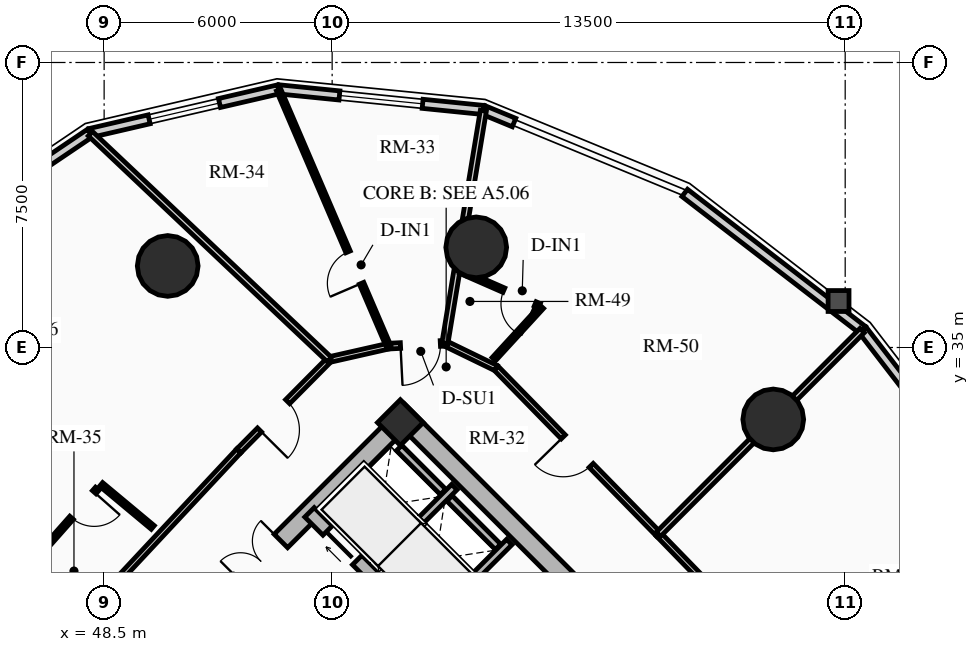
"""IFC4 building model, lengths in metres.
Left out: names, types, materials, properties, quantities, classifications, styles, units other than length and angle.
Written with IfcOpenShell. Run it as: python <this file> out.ifc"""

import sys

from ifc_helpers import new_model, si_unit, direction, frame, frame_2d, origin, origin_2d, place, context, subcontext, project, spatial, rectangle, circle, extrude, source, transform, mapped, element, fill, save


model = new_model("IFC4")
c1 = context("Model", 3, precision=1e-05, world=origin(), true_north=direction((0.0, 1.0)))
c2 = subcontext(c1, "Body", "Model", "MODEL_VIEW")
j1 = project(units=[si_unit("LENGTHUNIT", "METRE"), si_unit("PLANEANGLEUNIT", "RADIAN")], contexts=[c1])
p1 = place(None, origin())
s1 = spatial("IfcSite", under=j1, at=p1, CompositionType="ELEMENT")
p2 = place(p1, origin())
s2 = spatial("IfcBuilding", under=s1, at=p2, CompositionType="ELEMENT")
p3 = place(p2, frame((0.0, 0.0, 36.55)))
s3 = spatial("IfcBuildingStorey", under=s2, at=p3, CompositionType="ELEMENT", Elevation=36.55)
p4 = place(p3, frame((66.339, 23.227, 0.0), z_axis=(0.0, 0.0, 1.0), x_axis=(-0.707106781187, 0.707106781187, 0.0)))
e1 = element("IfcWall", 1, at=p4, inside=s3, PredefinedType="SHEAR", context=c2, shape_type="SweptSolid", body=[
    extrude(rectangle(XDim=14.3, YDim=0.5, at=frame_2d((7.15, 0.0))), origin(), (0.0, 0.0, 1.0), 2.91),
])
p5 = place(p3, frame((48.838, 25.596, 0.0), z_axis=(0.0, 0.0, 1.0), x_axis=(0.707106781187, 0.707106781187, 0.0)))
e2 = element("IfcWall", 2, at=p5, inside=s3, PredefinedType="SHEAR", context=c2, shape_type="SweptSolid", body=[
    extrude(rectangle(XDim=10.7, YDim=0.5, at=frame_2d((5.35, 0.0))), origin(), (0.0, 0.0, 1.0), 2.91),
])
m1 = source(origin(), c2, "Body", "SweptSolid", [
    extrude(rectangle(XDim=1.5, YDim=2.02, at=frame_2d((0.75, 1.01))), frame((0.0, 0.26, 0.0), z_axis=(0.0, -1.0, 0.0), x_axis=(1.0, 0.0, 0.0)), (0.0, 0.0, 1.0), 0.52),
])
p6 = place(p5, frame((4.6, 0.0, 0.0)))
e3 = element("IfcOpeningElement", 3, at=p6, cuts=e2, PredefinedType="OPENING", context=c2, shape_type="MappedRepresentation", body=[
    mapped(m1, transform((0.0, 0.0, 0.0), x_axis=(1.0, 0.0, 0.0), y_axis=(0.0, 1.0, 0.0), z_axis=(0.0, 0.0, 1.0), scale=1.0)),
])
p7 = place(p3, frame((63.662, 20.904, 0.0), z_axis=(0.0, 0.0, 1.0), x_axis=(-0.707106781187, 0.707106781187, 0.0)))
e4 = element("IfcWall", 4, at=p7, inside=s3, PredefinedType="SHEAR", context=c2, shape_type="SweptSolid", body=[
    extrude(rectangle(XDim=13.8, YDim=0.35, at=frame_2d((6.9, 0.0))), origin(), (0.0, 0.0, 1.0), 2.91),
])
m2 = source(origin(), c2, "Body", "SweptSolid", [
    extrude(rectangle(XDim=1.1, YDim=2.015, at=frame_2d((0.55, 1.007))), frame((0.0, 0.185, 0.0), z_axis=(0.0, -1.0, 0.0), x_axis=(1.0, 0.0, 0.0)), (0.0, 0.0, 1.0), 0.37),
])
p8 = place(p7, frame((10.025, 0.0, 0.0)))
e5 = element("IfcOpeningElement", 5, at=p8, cuts=e4, PredefinedType="OPENING", context=c2, shape_type="MappedRepresentation", body=[
    mapped(m2, transform((0.0, 0.0, 0.0), x_axis=(1.0, 0.0, 0.0), y_axis=(0.0, 1.0, 0.0), z_axis=(0.0, 0.0, 1.0), scale=1.0)),
])
p9 = place(p7, frame((12.025, 0.0, 0.0)))
e6 = element("IfcOpeningElement", 6, at=p9, cuts=e4, PredefinedType="OPENING", context=c2, shape_type="MappedRepresentation", body=[
    mapped(m2, transform((0.0, 0.0, 0.0), x_axis=(1.0, 0.0, 0.0), y_axis=(0.0, 1.0, 0.0), z_axis=(0.0, 0.0, 1.0), scale=1.0)),
])
m3 = source(origin(), c2, "Body", "SweptSolid", [
    extrude(rectangle(XDim=1.15, YDim=2.02, at=frame_2d((0.575, 1.01))), frame((0.0, 0.185, 0.0), z_axis=(0.0, -1.0, 0.0), x_axis=(1.0, 0.0, 0.0)), (0.0, 0.0, 1.0), 0.37),
])
p10 = place(p7, frame((5.33, 0.0, 0.0)))
e7 = element("IfcOpeningElement", 7, at=p10, cuts=e4, PredefinedType="OPENING", context=c2, shape_type="MappedRepresentation", body=[
    mapped(m3, transform((0.0, 0.0, 0.0), x_axis=(1.0, 0.0, 0.0), y_axis=(0.0, 1.0, 0.0), z_axis=(0.0, 0.0, 1.0), scale=1.0)),
])
p11 = place(p3, frame((56.294, 33.024, 0.0), z_axis=(0.0, 0.0, 1.0), x_axis=(0.707106781187, 0.707106781187, 0.0)))
e8 = element("IfcColumn", 8, at=p11, inside=s3, PredefinedType="COLUMN", context=c2, shape_type="SweptSolid", body=[
    extrude(rectangle(XDim=0.85, YDim=0.85, at=origin_2d()), origin(), (0.0, 0.0, 1.0), 2.91),
])
for number, where, z_axis, x_axis in (
    (9, (66.107, 33.107, 0.0), (0.0, 0.0, 1.0), (1.0, 0.0, 0.0)),
    (10, (58.291, 37.635, 0.0), (0.0, 0.0, 1.0), (1.0, 0.0, 0.0)),
    (11, (50.173, 37.146, 0.0), (0.0, 0.0, 1.0), (1.0, 0.0, 0.0)),
):
    element("IfcColumn", number, at=place(p3, frame(where, z_axis=z_axis, x_axis=x_axis)), inside=s3, PredefinedType="USERDEFINED", context=c2, shape_type="SweptSolid", body=[
        extrude(circle(Radius=0.8, at=origin_2d()), origin(), (0.0, 0.0, 1.0), 2.91),
    ])
p12 = place(p3, frame((63.778, 39.068, 0.0), z_axis=(0.0, 0.0, 1.0), x_axis=(0.792020182601, -0.610494906082, 0.0)))
e12 = element("IfcWall", 12, at=p12, inside=s3, PredefinedType="SOLIDWALL", context=c2, shape_type="SweptSolid", body=[
    extrude(rectangle(XDim=5.911, YDim=0.24, at=frame_2d((2.956, 0.0))), origin(), (0.0, 0.0, 1.0), 2.073),
])
p13 = place(p3, frame((58.482, 41.251, 0.0), z_axis=(0.0, 0.0, 1.0), x_axis=(0.924556017656, -0.381046152345, 0.0)))
e13 = element("IfcWall", 13, at=p13, inside=s3, PredefinedType="SOLIDWALL", context=c2, shape_type="SweptSolid", body=[
    extrude(rectangle(XDim=0.87, YDim=0.24, at=frame_2d((0.435, 0.0))), origin(), (0.0, 0.0, 1.0), 2.073),
])
p14 = place(p3, frame((53.09, 41.794, 0.0), z_axis=(0.0, 0.0, 1.0), x_axis=(0.994968263437, -0.100190592135, 0.0)))
e14 = element("IfcWall", 14, at=p14, inside=s3, PredefinedType="SOLIDWALL", context=c2, shape_type="SweptSolid", body=[
    extrude(rectangle(XDim=5.419, YDim=0.24, at=frame_2d((2.71, 0.0))), origin(), (0.0, 0.0, 1.0), 2.073),
])
m4 = source(origin(), c2, "Body", "SweptSolid", [
    extrude(rectangle(XDim=2.2, YDim=1.35, at=frame_2d((1.1, 0.675))), frame((0.0, 0.13, 0.0), z_axis=(0.0, -1.0, 0.0), x_axis=(1.0, 0.0, 0.0)), (0.0, 0.0, 1.0), 0.26),
])
p15 = place(p14, frame((1.61, 0.0, 0.65)))
e15 = element("IfcOpeningElement", 15, at=p15, cuts=e14, PredefinedType="OPENING", context=c2, shape_type="MappedRepresentation", body=[
    mapped(m4, transform((0.0, 0.0, 0.0), x_axis=(1.0, 0.0, 0.0), y_axis=(0.0, 1.0, 0.0), z_axis=(0.0, 0.0, 1.0), scale=1.0)),
])
p16 = place(p3, frame((48.129, 40.644, 0.0), z_axis=(0.0, 0.0, 1.0), x_axis=(0.974167686491, 0.22582585901, 0.0)))
e16 = element("IfcWall", 16, at=p16, inside=s3, PredefinedType="SOLIDWALL", context=c2, shape_type="SweptSolid", body=[
    extrude(rectangle(XDim=5.092, YDim=0.24, at=frame_2d((2.546, 0.0))), origin(), (0.0, 0.0, 1.0), 2.073),
])
m5 = source(origin(), c2, "Body", "SweptSolid", [
    extrude(rectangle(XDim=1.9, YDim=1.35, at=frame_2d((0.95, 0.675))), frame((0.0, 0.13, 0.0), z_axis=(0.0, -1.0, 0.0), x_axis=(1.0, 0.0, 0.0)), (0.0, 0.0, 1.0), 0.26),
])
p17 = place(p16, frame((1.596, 0.0, 0.65)))
e17 = element("IfcOpeningElement", 17, at=p17, cuts=e16, PredefinedType="OPENING", context=c2, shape_type="MappedRepresentation", body=[
    mapped(m5, transform((0.0, 0.0, 0.0), x_axis=(1.0, 0.0, 0.0), y_axis=(0.0, 1.0, 0.0), z_axis=(0.0, 0.0, 1.0), scale=1.0)),
])
p18 = place(p3, frame((44.086, 37.914, 0.0), z_axis=(0.0, 0.0, 1.0), x_axis=(0.828748297084, 0.559621532896, 0.0)))
e18 = element("IfcWall", 18, at=p18, inside=s3, PredefinedType="SOLIDWALL", context=c2, shape_type="SweptSolid", body=[
    extrude(rectangle(XDim=4.879, YDim=0.24, at=frame_2d((2.439, 0.0))), origin(), (0.0, 0.0, 1.0), 2.073),
])
p19 = place(p3, frame((68.459, 35.459, 0.0), z_axis=(0.0, 0.0, 1.0), x_axis=(0.610494906082, -0.792020182601, 0.0)))
e19 = element("IfcWall", 19, at=p19, inside=s3, PredefinedType="SOLIDWALL", context=c2, shape_type="SweptSolid", body=[
    extrude(rectangle(XDim=5.911, YDim=0.24, at=frame_2d((2.956, 0.0))), origin(), (0.0, 0.0, 1.0), 2.073),
])
p20 = place(p19, frame((2.005, 0.0, 0.65)))
e20 = element("IfcOpeningElement", 20, at=p20, cuts=e19, PredefinedType="OPENING", context=c2, shape_type="MappedRepresentation", body=[
    mapped(m5, transform((0.0, 0.0, 0.0), x_axis=(1.0, 0.0, 0.0), y_axis=(0.0, 1.0, 0.0), z_axis=(0.0, 0.0, 1.0), scale=1.0)),
])
p21 = place(p3, frame((57.062, 27.781, 0.0), z_axis=(0.0, 0.0, 1.0), x_axis=(0.707106781187, 0.707106781187, 0.0)))
e21 = element("IfcWall", 21, at=p21, inside=s3, PredefinedType="SHEAR", context=c2, shape_type="SweptSolid", body=[
    extrude(rectangle(XDim=2.97, YDim=0.2, at=frame_2d((1.485, 0.0))), origin(), (0.0, 0.0, 1.0), 2.91),
])
p22 = place(p3, frame((55.615, 29.227, 0.0), z_axis=(0.0, 0.0, 1.0), x_axis=(0.707147878904, 0.70706568108, 0.0)))
e22 = element("IfcWall", 22, at=p22, inside=s3, PredefinedType="SHEAR", context=c2, shape_type="SweptSolid", body=[
    extrude(rectangle(XDim=2.97, YDim=0.2, at=frame_2d((1.485, 0.0))), origin(), (0.0, 0.0, 1.0), 2.91),
])
p23 = place(p3, frame((58.865, 29.754, 0.0), z_axis=(0.0, 0.0, 1.0), x_axis=(-0.707174411312, 0.707039144592, 0.0)))
e23 = element("IfcWall", 23, at=p23, inside=s3, PredefinedType="SHEAR", context=c2, shape_type="SweptSolid", body=[
    extrude(rectangle(XDim=1.805, YDim=0.2, at=frame_2d((0.902, 0.0))), origin(), (0.0, 0.0, 1.0), 2.91),
])
p24 = place(p3, frame((57.419, 31.2, 0.0), z_axis=(0.0, 0.0, 1.0), x_axis=(-0.707032117043, 0.707181437447, 0.0)))
e24 = element("IfcWall", 24, at=p24, inside=s3, PredefinedType="SHEAR", context=c2, shape_type="SweptSolid", body=[
    extrude(rectangle(XDim=1.635, YDim=0.2, at=frame_2d((0.817, 0.0))), origin(), (0.0, 0.0, 1.0), 2.91),
])
p25 = place(p3, frame((63.086, 30.086, 0.0), z_axis=(0.0, 0.0, 1.0), x_axis=(-0.699075897379, 0.715047473741, 0.0)))
e25 = element("IfcWall", 25, at=p25, inside=s3, PredefinedType="PARTITIONING", context=c2, shape_type="SweptSolid", body=[
    extrude(rectangle(XDim=6.114, YDim=0.15, at=frame_2d((3.057, 0.0))), origin(), (0.0, 0.0, 1.0), 2.159),
])
m6 = source(origin(), c2, "Body", "SweptSolid", [
    extrude(rectangle(XDim=1.05, YDim=2.015, at=frame_2d((0.525, 1.007))), frame((0.0, 0.085, 0.0), z_axis=(0.0, -1.0, 0.0), x_axis=(1.0, 0.0, 0.0)), (0.0, 0.0, 1.0), 0.17),
])
p26 = place(p25, frame((2.532, 0.0, 0.0)))
e26 = element("IfcOpeningElement", 26, at=p26, cuts=e25, PredefinedType="OPENING", context=c2, shape_type="MappedRepresentation", body=[
    mapped(m6, transform((0.0, 0.0, 0.0), x_axis=(1.0, 0.0, 0.0), y_axis=(0.0, 1.0, 0.0), z_axis=(0.0, 0.0, 1.0), scale=1.0)),
])
p27 = place(p3, frame((58.812, 34.458, 0.0), z_axis=(0.0, 0.0, 1.0), x_axis=(-0.899559490277, 0.436798264021, 0.0)))
e27 = element("IfcWall", 27, at=p27, inside=s3, PredefinedType="PARTITIONING", context=c2, shape_type="SweptSolid", body=[
    extrude(rectangle(XDim=1.495, YDim=0.15, at=frame_2d((0.748, 0.0))), origin(), (0.0, 0.0, 1.0), 2.205),
])
p28 = place(p3, frame((57.467, 35.111, 0.0), z_axis=(0.0, 0.0, 1.0), x_axis=(-0.998691757323, -0.051134859488, 0.0)))
e28 = element("IfcWall", 28, at=p28, inside=s3, PredefinedType="PARTITIONING", context=c2, shape_type="SweptSolid", body=[
    extrude(rectangle(XDim=1.485, YDim=0.15, at=frame_2d((0.742, 0.0))), origin(), (0.0, 0.0, 1.0), 2.159),
])
p29 = place(p28, frame((0.12, 0.0, 0.0)))
e29 = element("IfcOpeningElement", 29, at=p29, cuts=e28, PredefinedType="OPENING", context=c2, shape_type="MappedRepresentation", body=[
    mapped(m6, transform((0.0, 0.0, 0.0), x_axis=(1.0, 0.0, 0.0), y_axis=(0.0, 1.0, 0.0), z_axis=(0.0, 0.0, 1.0), scale=1.0)),
])
p30 = place(p3, frame((55.984, 35.035, 0.0), z_axis=(0.0, 0.0, 1.0), x_axis=(-0.975290305708, -0.22092718165, 0.0)))
e30 = element("IfcWall", 30, at=p30, inside=s3, PredefinedType="PARTITIONING", context=c2, shape_type="SweptSolid", body=[
    extrude(rectangle(XDim=1.597, YDim=0.15, at=frame_2d((0.798, 0.0))), origin(), (0.0, 0.0, 1.0), 2.205),
])
p31 = place(p3, frame((54.427, 34.683, 0.0), z_axis=(0.0, 0.0, 1.0), x_axis=(-0.704178989986, -0.710022499687, 0.0)))
e31 = element("IfcWall", 31, at=p31, inside=s3, PredefinedType="PARTITIONING", context=c2, shape_type="SweptSolid", body=[
    extrude(rectangle(XDim=3.384, YDim=0.15, at=frame_2d((1.692, 0.0))), origin(), (0.0, 0.0, 1.0), 2.159),
])
p32 = place(p31, frame((1.56, 0.0, 0.0)))
e32 = element("IfcOpeningElement", 32, at=p32, cuts=e31, PredefinedType="OPENING", context=c2, shape_type="MappedRepresentation", body=[
    mapped(m6, transform((0.0, 0.0, 0.0), x_axis=(1.0, 0.0, 0.0), y_axis=(0.0, 1.0, 0.0), z_axis=(0.0, 0.0, 1.0), scale=1.0)),
])
p33 = place(p3, frame((52.043, 32.28, 0.0), z_axis=(0.0, 0.0, 1.0), x_axis=(-0.682606081633, -0.730786519661, 0.0)))
e33 = element("IfcWall", 33, at=p33, inside=s3, PredefinedType="PARTITIONING", context=c2, shape_type="SweptSolid", body=[
    extrude(rectangle(XDim=6.527, YDim=0.15, at=frame_2d((3.263, 0.0))), origin(), (0.0, 0.0, 1.0), 2.159),
])
p34 = place(p3, frame((67.27, 25.78, 0.0), z_axis=(0.0, 0.0, 1.0), x_axis=(-0.696847842907, 0.717218992942, 0.0)))
e34 = element("IfcWall", 34, at=p34, inside=s3, PredefinedType="PARTITIONING", context=c2, shape_type="SweptSolid", body=[
    extrude(rectangle(XDim=6.004, YDim=0.15, at=frame_2d((3.002, 0.0))), origin(), (0.0, 0.0, 1.0), 2.635),
])
m7 = source(origin(), c2, "Body", "SweptSolid", [
    extrude(rectangle(XDim=1.0, YDim=2.015, at=frame_2d((0.5, 1.007))), frame((0.0, 0.085, 0.0), z_axis=(0.0, -1.0, 0.0), x_axis=(1.0, 0.0, 0.0)), (0.0, 0.0, 1.0), 0.17),
])
p35 = place(p34, frame((2.502, 0.0, 0.0)))
e35 = element("IfcOpeningElement", 35, at=p35, cuts=e34, PredefinedType="OPENING", context=c2, shape_type="MappedRepresentation", body=[
    mapped(m7, transform((0.0, 0.0, 0.0), x_axis=(1.0, 0.0, 0.0), y_axis=(0.0, 1.0, 0.0), z_axis=(0.0, 0.0, 1.0), scale=1.0)),
])
p36 = place(p3, frame((63.086, 30.086, 0.0), z_axis=(0.0, 0.0, 1.0), x_axis=(0.707106781187, 0.707106781187, 0.0)))
e36 = element("IfcWall", 36, at=p36, inside=s3, PredefinedType="PARTITIONING", context=c2, shape_type="SweptSolid", body=[
    extrude(rectangle(XDim=7.579, YDim=0.16, at=frame_2d((3.79, 0.0))), origin(), (0.0, 0.0, 1.0), 2.073),
])
p37 = place(p3, frame((57.467, 35.111, 0.0), z_axis=(0.0, 0.0, 1.0), x_axis=(0.163141505202, 0.986602680556, 0.0)))
e37 = element("IfcWall", 37, at=p37, inside=s3, PredefinedType="PARTITIONING", context=c2, shape_type="SweptSolid", body=[
    extrude(rectangle(XDim=6.203, YDim=0.16, at=frame_2d((3.102, 0.0))), origin(), (0.0, 0.0, 1.0), 2.073),
])
p38 = place(p3, frame((54.427, 34.683, 0.0), z_axis=(0.0, 0.0, 1.0), x_axis=(-0.726732956694, 0.686920089716, 0.0)))
e38 = element("IfcWall", 38, at=p38, inside=s3, PredefinedType="PARTITIONING", context=c2, shape_type="SweptSolid", body=[
    extrude(rectangle(XDim=8.653, YDim=0.16, at=frame_2d((4.326, 0.0))), origin(), (0.0, 0.0, 1.0), 2.073),
])
p39 = place(p3, frame((47.588, 27.51, 0.0), z_axis=(0.0, 0.0, 1.0), x_axis=(-0.699371977892, 0.714757886657, 0.0)))
e39 = element("IfcWall", 39, at=p39, inside=s3, PredefinedType="PARTITIONING", context=c2, shape_type="SweptSolid", body=[
    extrude(rectangle(XDim=8.886, YDim=0.16, at=frame_2d((4.443, 0.0))), origin(), (0.0, 0.0, 1.0), 2.073),
])
p40 = place(p3, frame((55.984, 35.035, 0.0), z_axis=(0.0, 0.0, 1.0), x_axis=(-0.394244760106, 0.919005478291, 0.0)))
e40 = element("IfcWall", 40, at=p40, inside=s3, PredefinedType="PARTITIONING", context=c2, shape_type="SweptSolid", body=[
    extrude(rectangle(XDim=7.333, YDim=0.125, at=frame_2d((3.667, 0.0))), origin(), (0.0, 0.0, 1.0), 2.073),
])
m8 = source(origin(), c2, "Body", "SweptSolid", [
    extrude(rectangle(XDim=0.9, YDim=2.005, at=frame_2d((0.45, 1.002))), frame((0.0, 0.073, 0.0), z_axis=(0.0, -1.0, 0.0), x_axis=(1.0, 0.0, 0.0)), (0.0, 0.0, 1.0), 0.145),
])
p41 = place(p40, frame((1.8, 0.0, 0.0)))
e41 = element("IfcOpeningElement", 41, at=p41, cuts=e40, PredefinedType="OPENING", context=c2, shape_type="MappedRepresentation", body=[
    mapped(m8, transform((0.0, 0.0, 0.0), x_axis=(1.0, 0.0, 0.0), y_axis=(0.0, 1.0, 0.0), z_axis=(0.0, 0.0, 1.0), scale=1.0)),
])
p42 = place(p3, frame((49.78, 30.264, 0.0), z_axis=(0.0, 0.0, 1.0), x_axis=(-0.768209972595, 0.640197967824, 0.0)))
e42 = element("IfcWall", 42, at=p42, inside=s3, PredefinedType="PARTITIONING", context=c2, shape_type="SweptSolid", body=[
    extrude(rectangle(XDim=1.77, YDim=0.125, at=frame_2d((0.885, 0.0))), origin(), (0.0, 0.0, 1.0), 2.635),
])
p43 = place(p3, frame((48.318, 31.282, 0.0), z_axis=(0.0, 0.0, 1.0), x_axis=(-0.662365127428, -0.749181178333, 0.0)))
e43 = element("IfcWall", 43, at=p43, inside=s3, PredefinedType="PARTITIONING", context=c2, shape_type="SweptSolid", body=[
    extrude(rectangle(XDim=2.953, YDim=0.125, at=frame_2d((1.477, 0.0))), origin(), (0.0, 0.0, 1.0), 2.159),
])
p44 = place(p43, frame((0.12, 0.0, 0.0)))
e44 = element("IfcOpeningElement", 44, at=p44, cuts=e43, PredefinedType="OPENING", context=c2, shape_type="MappedRepresentation", body=[
    mapped(m8, transform((0.0, 0.0, 0.0), x_axis=(1.0, 0.0, 0.0), y_axis=(0.0, 1.0, 0.0), z_axis=(0.0, 0.0, 1.0), scale=1.0)),
])
p45 = place(p3, frame((58.756, 34.694, 0.0), z_axis=(0.0, 0.0, 1.0), x_axis=(0.675641726749, 0.73723012491, 0.0)))
e45 = element("IfcWall", 45, at=p45, inside=s3, PredefinedType="PARTITIONING", context=c2, shape_type="SweptSolid", body=[
    extrude(rectangle(XDim=1.867, YDim=0.125, at=frame_2d((0.934, 0.0))), origin(), (0.0, 0.0, 1.0), 2.205),
])
p46 = place(p3, frame((59.952, 36.099, 0.0), z_axis=(0.0, 0.0, 1.0), x_axis=(-0.915914750605, 0.401372856113, 0.0)))
e46 = element("IfcWall", 46, at=p46, inside=s3, PredefinedType="PARTITIONING", context=c2, shape_type="SweptSolid", body=[
    extrude(rectangle(XDim=2.265, YDim=0.125, at=frame_2d((1.133, 0.0))), origin(), (0.0, 0.0, 1.0), 2.159),
])
p47 = place(p46, frame((0.12, 0.0, 0.0)))
e47 = element("IfcOpeningElement", 47, at=p47, cuts=e46, PredefinedType="OPENING", context=c2, shape_type="MappedRepresentation", body=[
    mapped(m8, transform((0.0, 0.0, 0.0), x_axis=(1.0, 0.0, 0.0), y_axis=(0.0, 1.0, 0.0), z_axis=(0.0, 0.0, 1.0), scale=1.0)),
])
m9 = source(origin(), c2, "Body", "SweptSolid", [
    extrude(rectangle(XDim=2.2, YDim=1.35, at=frame_2d((1.1, 0.675))), frame((0.0, 0.03, 0.0), z_axis=(0.0, -1.0, 0.0), x_axis=(1.0, 0.0, 0.0)), (0.0, 0.0, 1.0), 0.06),
])
p48 = place(p15, origin())
e48 = element("IfcWindow", 48, at=p48, inside=s3, PartitioningType="DOUBLE_PANEL_VERTICAL", PredefinedType="WINDOW", context=c2, shape_type="MappedRepresentation", body=[
    mapped(m9, transform((0.0, 0.0, 0.0), x_axis=(1.0, 0.0, 0.0), y_axis=(0.0, 1.0, 0.0), z_axis=(0.0, 0.0, 1.0), scale=1.0)),
])
fill(e15, e48)
m10 = source(origin(), c2, "Body", "SweptSolid", [
    extrude(rectangle(XDim=1.9, YDim=1.35, at=frame_2d((0.95, 0.675))), frame((0.0, 0.03, 0.0), z_axis=(0.0, -1.0, 0.0), x_axis=(1.0, 0.0, 0.0)), (0.0, 0.0, 1.0), 0.06),
])
p49 = place(p17, origin())
e49 = element("IfcWindow", 49, at=p49, inside=s3, PartitioningType="DOUBLE_PANEL_VERTICAL", PredefinedType="WINDOW", context=c2, shape_type="MappedRepresentation", body=[
    mapped(m10, transform((0.0, 0.0, 0.0), x_axis=(1.0, 0.0, 0.0), y_axis=(0.0, 1.0, 0.0), z_axis=(0.0, 0.0, 1.0), scale=1.0)),
])
fill(e17, e49)
m11 = source(origin(), c2, "Body", "SweptSolid", [
    extrude(rectangle(XDim=1.1, YDim=2.015, at=frame_2d((0.55, 1.007))), frame((0.0, 0.025, 0.0), z_axis=(0.0, -1.0, 0.0), x_axis=(1.0, 0.0, 0.0)), (0.0, 0.0, 1.0), 0.05),
])
p50 = place(p9, origin())
e50 = element("IfcDoor", 50, at=p50, inside=s3, OperationType="SLIDING_TO_RIGHT", PredefinedType="DOOR", context=c2, shape_type="MappedRepresentation", body=[
    mapped(m11, transform((0.0, 0.0, 0.0), x_axis=(1.0, 0.0, 0.0), y_axis=(0.0, 1.0, 0.0), z_axis=(0.0, 0.0, 1.0), scale=1.0)),
])
fill(e6, e50)
m12 = source(origin(), c2, "Body", "SweptSolid", [
    extrude(rectangle(XDim=1.5, YDim=2.02, at=frame_2d((0.75, 1.01))), frame((0.0, 0.025, 0.0), z_axis=(0.0, -1.0, 0.0), x_axis=(1.0, 0.0, 0.0)), (0.0, 0.0, 1.0), 0.05),
])
p51 = place(p6, origin())
e51 = element("IfcDoor", 51, at=p51, inside=s3, OperationType="DOUBLE_DOOR_SINGLE_SWING", PredefinedType="DOOR", context=c2, shape_type="MappedRepresentation", body=[
    mapped(m12, transform((0.0, 0.0, 0.0), x_axis=(1.0, 0.0, 0.0), y_axis=(0.0, 1.0, 0.0), z_axis=(0.0, 0.0, 1.0), scale=1.0)),
])
fill(e3, e51)
m13 = source(origin(), c2, "Body", "SweptSolid", [
    extrude(rectangle(XDim=1.05, YDim=2.015, at=frame_2d((0.525, 1.007))), frame((0.0, 0.025, 0.0), z_axis=(0.0, -1.0, 0.0), x_axis=(1.0, 0.0, 0.0)), (0.0, 0.0, 1.0), 0.05),
])
p52 = place(p29, origin())
e52 = element("IfcDoor", 52, at=p52, inside=s3, OperationType="SINGLE_SWING_RIGHT", PredefinedType="DOOR", context=c2, shape_type="MappedRepresentation", body=[
    mapped(m13, transform((0.0, 0.0, 0.0), x_axis=(1.0, 0.0, 0.0), y_axis=(0.0, 1.0, 0.0), z_axis=(0.0, 0.0, 1.0), scale=1.0)),
])
fill(e29, e52)
m14 = source(origin(), c2, "Body", "SweptSolid", [
    extrude(rectangle(XDim=0.9, YDim=2.005, at=frame_2d((0.45, 1.002))), frame((0.0, 0.025, 0.0), z_axis=(0.0, -1.0, 0.0), x_axis=(1.0, 0.0, 0.0)), (0.0, 0.0, 1.0), 0.05),
])
p53 = place(p41, origin())
e53 = element("IfcDoor", 53, at=p53, inside=s3, OperationType="SINGLE_SWING_LEFT", PredefinedType="DOOR", context=c2, shape_type="MappedRepresentation", body=[
    mapped(m14, transform((0.0, 0.0, 0.0), x_axis=(1.0, 0.0, 0.0), y_axis=(0.0, 1.0, 0.0), z_axis=(0.0, 0.0, 1.0), scale=1.0)),
])
fill(e41, e53)
p54 = place(p32, origin())
e54 = element("IfcDoor", 54, at=p54, inside=s3, OperationType="SINGLE_SWING_RIGHT", PredefinedType="DOOR", context=c2, shape_type="MappedRepresentation", body=[
    mapped(m13, transform((0.0, 0.0, 0.0), x_axis=(1.0, 0.0, 0.0), y_axis=(0.0, 1.0, 0.0), z_axis=(0.0, 0.0, 1.0), scale=1.0)),
])
fill(e32, e54)
p55 = place(p44, origin())
e55 = element("IfcDoor", 55, at=p55, inside=s3, OperationType="SINGLE_SWING_LEFT", PredefinedType="DOOR", context=c2, shape_type="MappedRepresentation", body=[
    mapped(m14, transform((0.0, 0.0, 0.0), x_axis=(1.0, 0.0, 0.0), y_axis=(0.0, 1.0, 0.0), z_axis=(0.0, 0.0, 1.0), scale=1.0)),
])
fill(e44, e55)
p56 = place(p26, origin())
e56 = element("IfcDoor", 56, at=p56, inside=s3, OperationType="SINGLE_SWING_RIGHT", PredefinedType="DOOR", context=c2, shape_type="MappedRepresentation", body=[
    mapped(m13, transform((0.0, 0.0, 0.0), x_axis=(1.0, 0.0, 0.0), y_axis=(0.0, 1.0, 0.0), z_axis=(0.0, 0.0, 1.0), scale=1.0)),
])
fill(e26, e56)
p57 = place(p47, origin())
e57 = element("IfcDoor", 57, at=p57, inside=s3, OperationType="SINGLE_SWING_LEFT", PredefinedType="DOOR", context=c2, shape_type="MappedRepresentation", body=[
    mapped(m14, transform((0.0, 0.0, 0.0), x_axis=(1.0, 0.0, 0.0), y_axis=(0.0, 1.0, 0.0), z_axis=(0.0, 0.0, 1.0), scale=1.0)),
])
fill(e47, e57)
save(model, sys.argv[1])
